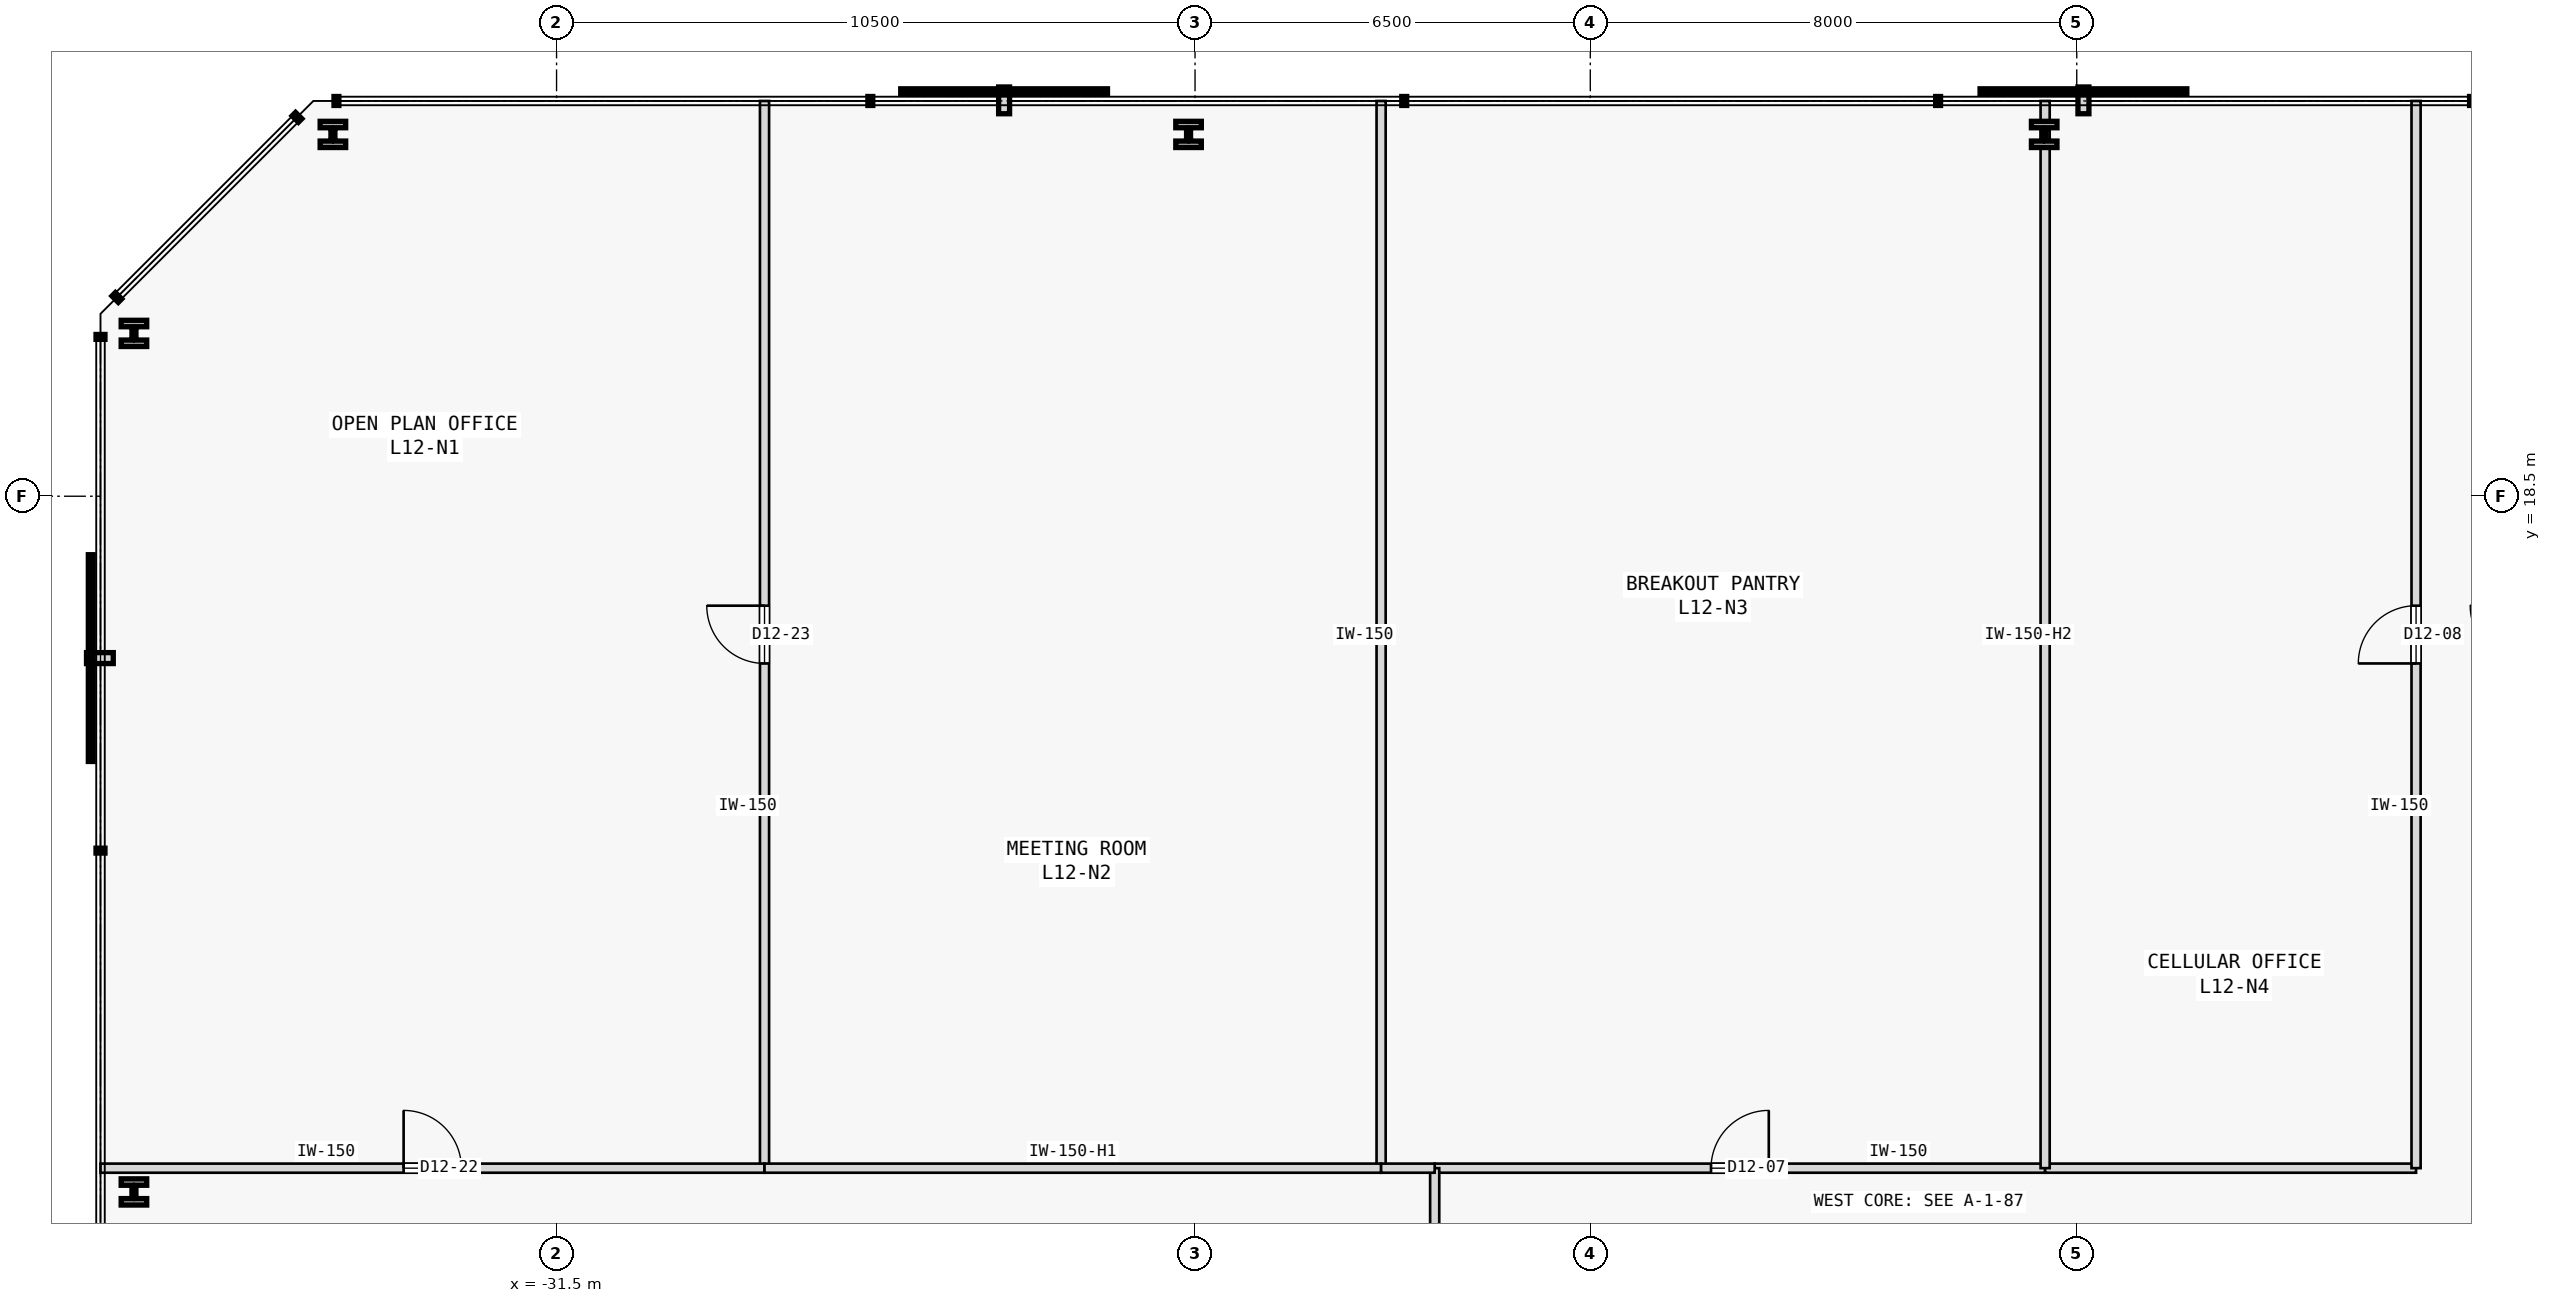
"""IFC4 building model, lengths in metres.
Left out: names, types, materials, properties, quantities, classifications, styles, units other than length and angle.
Written with IfcOpenShell. Run it as: python <this file> out.ifc"""

import sys

from ifc_helpers import new_model, si_unit, direction, frame, frame_2d, origin, origin_2d, place, context, subcontext, project, spatial, rectangle, i_section, extrude, element, fill, save


model = new_model("IFC4")
c1 = context("Model", 3, precision=1e-05, world=origin(), true_north=direction((0.0, 1.0)))
c2 = subcontext(c1, "Body", "Model", "MODEL_VIEW")
j1 = project(units=[si_unit("LENGTHUNIT", "METRE"), si_unit("PLANEANGLEUNIT", "RADIAN")], contexts=[c1])
p1 = place(None, origin())
s1 = spatial("IfcSite", under=j1, at=p1, CompositionType="ELEMENT")
p2 = place(p1, origin())
s2 = spatial("IfcBuilding", under=s1, at=p2, CompositionType="ELEMENT")
p3 = place(p2, frame((0.0, 0.0, 52.2)))
s3 = spatial("IfcBuildingStorey", under=s2, at=p3, CompositionType="ELEMENT", Elevation=52.2)
for number, where, z_axis, x_axis in (
    (1, (-7.036, 24.45, 0.0), (0.0, 0.0, 1.0), (1.0, 0.0, 0.0)),
    (2, (-21.107, 24.45, 0.0), (0.0, 0.0, 1.0), (1.0, 0.0, 0.0)),
    (3, (-35.178, 24.45, 0.0), (0.0, 0.0, 1.0), (1.0, 0.0, 0.0)),
    (4, (-38.45, 21.178, 0.0), (0.0, 0.0, 1.0), (1.0, 0.0, 0.0)),
    (5, (-38.45, 7.059, 0.0), (0.0, 0.0, 1.0), (1.0, 0.0, 0.0)),
):
    element("IfcColumn", number, at=place(p3, frame(where, z_axis=z_axis, x_axis=x_axis)), inside=s3, PredefinedType="COLUMN", context=c2, shape_type="SweptSolid", body=[
        extrude(i_section(OverallWidth=0.42, OverallDepth=0.431, WebThickness=0.065, FlangeThickness=0.106, FilletRadius=0.015, at=origin_2d()), origin(), (0.0, 0.0, 1.0), 3.8),
    ])
p4 = place(p3, frame((-17.059, 7.45, 0.0), z_axis=(0.0, 0.0, 1.0), x_axis=(1.0, 0.0, 0.0)))
e6 = element("IfcWall", 6, at=p4, inside=s3, PredefinedType="PARTITIONING", context=c2, shape_type="SweptSolid", body=[
    extrude(rectangle(XDim=10.039, YDim=0.15, at=frame_2d((5.02, 0.0))), origin(), (0.0, 0.0, 1.0), 3.575),
])
p5 = place(p4, frame((4.544, 0.0, 0.0)))
e7 = element("IfcOpeningElement", 7, at=p5, cuts=e6, PredefinedType="OPENING", context=c2, shape_type="SweptSolid", body=[
    extrude(rectangle(XDim=0.95, YDim=2.15, at=frame_2d((0.475, 1.075))), frame((0.0, 0.085, 0.0), z_axis=(0.0, -1.0, 0.0), x_axis=(1.0, 0.0, 0.0)), (0.0, 0.0, 1.0), 0.17),
])
p6 = place(p3, frame((-7.02, 7.45, 0.0), z_axis=(0.0, 0.0, 1.0), x_axis=(1.0, 0.0, 0.0)))
e8 = element("IfcWall", 8, at=p6, inside=s3, PredefinedType="PARTITIONING", context=c2, shape_type="SweptSolid", body=[
    extrude(rectangle(XDim=6.1, YDim=0.15, at=frame_2d((3.05, 0.0))), origin(), (0.0, 0.0, 1.0), 3.575),
])
p7 = place(p3, frame((-0.92, 7.45, 0.0), z_axis=(0.0, 0.0, 1.0), x_axis=(0.0, 1.0, 0.0)))
e9 = element("IfcWall", 9, at=p7, inside=s3, PredefinedType="PARTITIONING", context=c2, shape_type="SweptSolid", body=[
    extrude(rectangle(XDim=17.55, YDim=0.15, at=frame_2d((8.775, 0.0))), origin(), (0.0, 0.0, 1.0), 3.575),
])
p8 = place(p7, frame((8.3, 0.0, 0.0)))
e10 = element("IfcOpeningElement", 10, at=p8, cuts=e9, PredefinedType="OPENING", context=c2, shape_type="SweptSolid", body=[
    extrude(rectangle(XDim=0.95, YDim=2.15, at=frame_2d((0.475, 1.075))), frame((0.0, 0.085, 0.0), z_axis=(0.0, -1.0, 0.0), x_axis=(1.0, 0.0, 0.0)), (0.0, 0.0, 1.0), 0.17),
])
p9 = place(p3, frame((-17.059, 2.086, 0.0), z_axis=(0.0, 0.0, 1.0), x_axis=(0.0, 1.0, 0.0)))
e11 = element("IfcWall", 11, at=p9, inside=s3, PredefinedType="PARTITIONING", context=c2, shape_type="SweptSolid", body=[
    extrude(rectangle(XDim=5.364, YDim=0.15, at=frame_2d((2.682, 0.0))), origin(), (0.0, 0.0, 1.0), 3.575),
])
p10 = place(p9, frame((0.705, 0.0, 0.0)))
e12 = element("IfcOpeningElement", 12, at=p10, cuts=e11, PredefinedType="OPENING", context=c2, shape_type="SweptSolid", body=[
    extrude(rectangle(XDim=0.95, YDim=2.15, at=frame_2d((0.475, 1.075))), frame((0.0, 0.085, 0.0), z_axis=(0.0, -1.0, 0.0), x_axis=(1.0, 0.0, 0.0)), (0.0, 0.0, 1.0), 0.17),
])
p11 = place(p3, frame((-28.08, 7.45, 0.0), z_axis=(0.0, 0.0, 1.0), x_axis=(0.0, 1.0, 0.0)))
e13 = element("IfcWall", 13, at=p11, inside=s3, PredefinedType="PARTITIONING", context=c2, shape_type="SweptSolid", body=[
    extrude(rectangle(XDim=17.55, YDim=0.15, at=frame_2d((8.775, 0.0))), origin(), (0.0, 0.0, 1.0), 3.575),
])
p12 = place(p11, frame((8.3, 0.0, 0.0)))
e14 = element("IfcOpeningElement", 14, at=p12, cuts=e13, PredefinedType="OPENING", context=c2, shape_type="SweptSolid", body=[
    extrude(rectangle(XDim=0.95, YDim=2.15, at=frame_2d((0.475, 1.075))), frame((0.0, 0.085, 0.0), z_axis=(0.0, -1.0, 0.0), x_axis=(1.0, 0.0, 0.0)), (0.0, 0.0, 1.0), 0.17),
])
p13 = place(p3, frame((-39.0, 7.45, 0.0), z_axis=(0.0, 0.0, 1.0), x_axis=(1.0, 0.0, 0.0)))
e15 = element("IfcWall", 15, at=p13, inside=s3, PredefinedType="PARTITIONING", context=c2, shape_type="SweptSolid", body=[
    extrude(rectangle(XDim=10.92, YDim=0.15, at=frame_2d((5.46, 0.0))), origin(), (0.0, 0.0, 1.0), 3.575),
])
p14 = place(p13, frame((4.985, 0.0, 0.0)))
e16 = element("IfcOpeningElement", 16, at=p14, cuts=e15, PredefinedType="OPENING", context=c2, shape_type="SweptSolid", body=[
    extrude(rectangle(XDim=0.95, YDim=2.15, at=frame_2d((0.475, 1.075))), frame((0.0, 0.085, 0.0), z_axis=(0.0, -1.0, 0.0), x_axis=(1.0, 0.0, 0.0)), (0.0, 0.0, 1.0), 0.17),
])
p15 = place(p3, frame((-17.94, 7.45, 0.0), z_axis=(0.0, 0.0, 1.0), x_axis=(0.0, 1.0, 0.0)))
e17 = element("IfcWall", 17, at=p15, inside=s3, PredefinedType="PARTITIONING", context=c2, shape_type="SweptSolid", body=[
    extrude(rectangle(XDim=17.55, YDim=0.15, at=frame_2d((8.775, 0.0))), origin(), (0.0, 0.0, 1.0), 3.575),
])
p16 = place(p3, frame((-28.08, 7.45, 0.0), z_axis=(0.0, 0.0, 1.0), x_axis=(1.0, 0.0, 0.0)))
e18 = element("IfcWall", 18, at=p16, inside=s3, PredefinedType="PARTITIONING", context=c2, shape_type="SweptSolid", body=[
    extrude(rectangle(XDim=10.14, YDim=0.15, at=frame_2d((5.07, 0.0))), origin(), (0.0, 0.0, 1.0), 3.125),
])
p17 = place(p3, frame((-7.02, 7.45, 0.0), z_axis=(0.0, 0.0, 1.0), x_axis=(0.0, 1.0, 0.0)))
e19 = element("IfcWall", 19, at=p17, inside=s3, PredefinedType="PARTITIONING", context=c2, shape_type="SweptSolid", body=[
    extrude(rectangle(XDim=17.55, YDim=0.15, at=frame_2d((8.775, 0.0))), origin(), (0.0, 0.0, 1.0), 2.975),
])
p18 = place(p3, frame((-17.94, 7.45, 0.0), z_axis=(0.0, 0.0, 1.0), x_axis=(1.0, 0.0, 0.0)))
e20 = element("IfcWall", 20, at=p18, inside=s3, PredefinedType="PARTITIONING", context=c2, shape_type="SweptSolid", body=[
    extrude(rectangle(XDim=0.881, YDim=0.15, at=frame_2d((0.44, 0.0))), origin(), (0.0, 0.0, 1.0), 3.575),
])
p19 = place(p5, origin())
e21 = element("IfcDoor", 21, at=p19, inside=s3, OperationType="SINGLE_SWING_RIGHT", PredefinedType="DOOR", context=c2, shape_type="SweptSolid", body=[
    extrude(rectangle(XDim=0.95, YDim=2.15, at=frame_2d((0.475, 1.075))), frame((0.0, 0.025, 0.0), z_axis=(0.0, -1.0, 0.0), x_axis=(1.0, 0.0, 0.0)), (0.0, 0.0, 1.0), 0.05),
])
fill(e7, e21)
p20 = place(p8, origin())
e22 = element("IfcDoor", 22, at=p20, inside=s3, OperationType="SINGLE_SWING_LEFT", PredefinedType="DOOR", context=c2, shape_type="SweptSolid", body=[
    extrude(rectangle(XDim=0.95, YDim=2.15, at=frame_2d((0.475, 1.075))), frame((0.0, 0.025, 0.0), z_axis=(0.0, -1.0, 0.0), x_axis=(1.0, 0.0, 0.0)), (0.0, 0.0, 1.0), 0.05),
])
fill(e10, e22)
p21 = place(p14, origin())
e23 = element("IfcDoor", 23, at=p21, inside=s3, OperationType="SINGLE_SWING_LEFT", PredefinedType="DOOR", context=c2, shape_type="SweptSolid", body=[
    extrude(rectangle(XDim=0.95, YDim=2.15, at=frame_2d((0.475, 1.075))), frame((0.0, 0.025, 0.0), z_axis=(0.0, -1.0, 0.0), x_axis=(1.0, 0.0, 0.0)), (0.0, 0.0, 1.0), 0.05),
])
fill(e16, e23)
p22 = place(p12, origin())
e24 = element("IfcDoor", 24, at=p22, inside=s3, OperationType="SINGLE_SWING_RIGHT", PredefinedType="DOOR", context=c2, shape_type="SweptSolid", body=[
    extrude(rectangle(XDim=0.95, YDim=2.15, at=frame_2d((0.475, 1.075))), frame((0.0, 0.025, 0.0), z_axis=(0.0, -1.0, 0.0), x_axis=(1.0, 0.0, 0.0)), (0.0, 0.0, 1.0), 0.05),
])
fill(e14, e24)
save(model, sys.argv[1])
